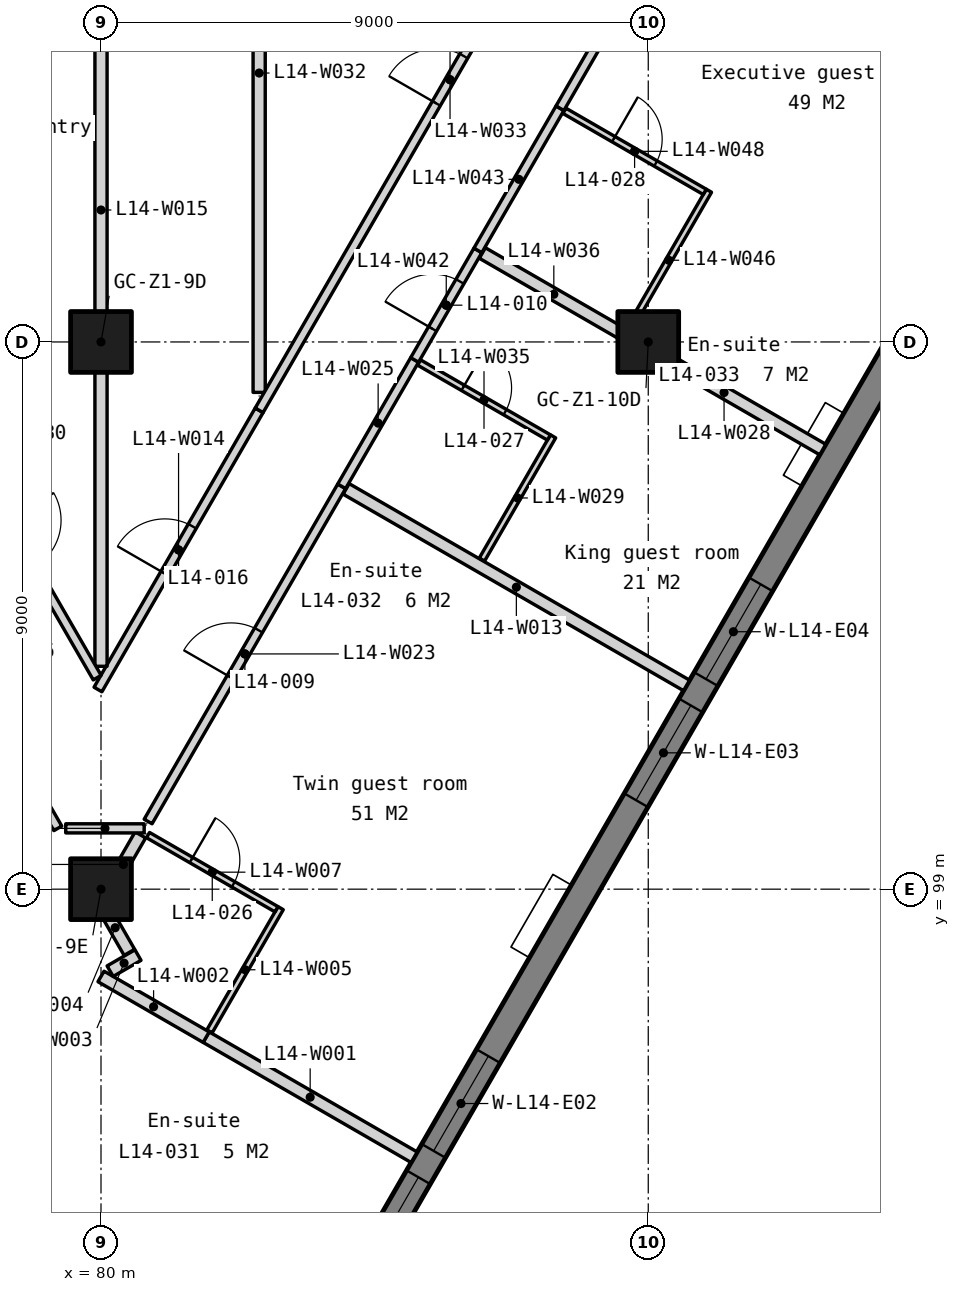
"""IFC4 building model, lengths in metres.
Left out: names, types, materials, properties, quantities, classifications, styles, units other than length and angle.
Written with IfcOpenShell. Run it as: python <this file> out.ifc"""

import sys

from ifc_helpers import new_model, si_unit, direction, frame, frame_2d, origin, origin_2d, place, context, subcontext, project, spatial, polyline, rectangle, outline, extrude, element, fill, save


model = new_model("IFC4")
c1 = context("Model", 3, precision=1e-05, world=origin(), true_north=direction((0.0, 1.0)))
c2 = subcontext(c1, "Body", "Model", "MODEL_VIEW")
j1 = project(units=[si_unit("LENGTHUNIT", "METRE"), si_unit("PLANEANGLEUNIT", "RADIAN")], contexts=[c1])
p1 = place(None, origin())
s1 = spatial("IfcSite", under=j1, at=p1, CompositionType="ELEMENT")
p2 = place(p1, origin())
s2 = spatial("IfcBuilding", under=s1, at=p2, CompositionType="ELEMENT")
p3 = place(p2, frame((0.0, 0.0, 63.0)))
s3 = spatial("IfcBuildingStorey", under=s2, at=p3, CompositionType="ELEMENT", Elevation=63.0)
for number, where, z_axis, x_axis in (
    (1, (80.0, 99.0, 0.0), (0.0, 0.0, 1.0), (1.0, 0.0, 0.0)),
    (2, (80.0, 108.0, 0.0), (0.0, 0.0, 1.0), (1.0, 0.0, 0.0)),
    (3, (89.0, 108.0, 0.0), (0.0, 0.0, 1.0), (1.0, 0.0, 0.0)),
):
    element("IfcColumn", number, at=place(p3, frame(where, z_axis=z_axis, x_axis=x_axis)), inside=s3, PredefinedType="COLUMN", context=c2, shape_type="SweptSolid", body=[
        extrude(rectangle(XDim=1.0, YDim=1.0, at=origin_2d()), origin(), (0.0, 0.0, 1.0), 3.5),
    ])
p4 = place(p3, frame((83.105, 90.599, -0.15), z_axis=(0.0, 0.0, 1.0), x_axis=(0.499999201451, 0.866025864826, 0.0)))
e4 = element("IfcWall", 4, at=p4, inside=s3, PredefinedType="SOLIDWALL", context=c2, shape_type="SweptSolid", body=[
    extrude(outline(polyline([(44.8, 0.0), (44.8, 3.5), (0.0, 3.5), (0.0, 0.0), (44.8, 0.0)])), frame((0.0, 0.225, 0.0), z_axis=(0.0, -1.0, 0.0), x_axis=(1.0, 0.0, 0.0)), (0.0, 0.0, 1.0), 0.45),
])
p5 = place(p4, frame((2.43, 0.0, 1.05)))
e5 = element("IfcOpeningElement", 5, at=p5, cuts=e4, PredefinedType="OPENING", context=c2, shape_type="SweptSolid", body=[
    extrude(rectangle(XDim=1.8, YDim=1.5, at=frame_2d((0.9, 0.75))), frame((0.0, 0.235, 0.0), z_axis=(0.0, -1.0, 0.0), x_axis=(1.0, 0.0, 0.0)), (0.0, 0.0, 1.0), 0.47),
])
p6 = place(p4, frame((4.73, 0.0, 1.05)))
e6 = element("IfcOpeningElement", 6, at=p6, cuts=e4, PredefinedType="OPENING", context=c2, shape_type="SweptSolid", body=[
    extrude(rectangle(XDim=1.8, YDim=1.5, at=frame_2d((0.9, 0.75))), frame((0.0, 0.235, 0.0), z_axis=(0.0, -1.0, 0.0), x_axis=(1.0, 0.0, 0.0)), (0.0, 0.0, 1.0), 0.47),
])
p7 = place(p4, frame((11.39, 0.0, 1.05)))
e7 = element("IfcOpeningElement", 7, at=p7, cuts=e4, PredefinedType="OPENING", context=c2, shape_type="SweptSolid", body=[
    extrude(rectangle(XDim=1.8, YDim=1.5, at=frame_2d((0.9, 0.75))), frame((0.0, 0.235, 0.0), z_axis=(0.0, -1.0, 0.0), x_axis=(1.0, 0.0, 0.0)), (0.0, 0.0, 1.0), 0.47),
])
p8 = place(p4, frame((13.69, 0.0, 1.05)))
e8 = element("IfcOpeningElement", 8, at=p8, cuts=e4, PredefinedType="OPENING", context=c2, shape_type="SweptSolid", body=[
    extrude(rectangle(XDim=1.8, YDim=1.5, at=frame_2d((0.9, 0.75))), frame((0.0, 0.235, 0.0), z_axis=(0.0, -1.0, 0.0), x_axis=(1.0, 0.0, 0.0)), (0.0, 0.0, 1.0), 0.47),
])
p9 = place(p4, frame((20.35, 0.0, 1.05)))
e9 = element("IfcOpeningElement", 9, at=p9, cuts=e4, PredefinedType="OPENING", context=c2, shape_type="SweptSolid", body=[
    extrude(rectangle(XDim=1.8, YDim=1.5, at=frame_2d((0.9, 0.75))), frame((0.0, 0.235, 0.0), z_axis=(0.0, -1.0, 0.0), x_axis=(1.0, 0.0, 0.0)), (0.0, 0.0, 1.0), 0.47),
])
p10 = place(p4, frame((22.65, 0.0, 1.05)))
e10 = element("IfcOpeningElement", 10, at=p10, cuts=e4, PredefinedType="OPENING", context=c2, shape_type="SweptSolid", body=[
    extrude(rectangle(XDim=1.8, YDim=1.5, at=frame_2d((0.9, 0.75))), frame((0.0, 0.235, 0.0), z_axis=(0.0, -1.0, 0.0), x_axis=(1.0, 0.0, 0.0)), (0.0, 0.0, 1.0), 0.47),
])
p11 = place(p4, frame((29.31, 0.0, 1.05)))
e11 = element("IfcOpeningElement", 11, at=p11, cuts=e4, PredefinedType="OPENING", context=c2, shape_type="SweptSolid", body=[
    extrude(rectangle(XDim=1.8, YDim=1.5, at=frame_2d((0.9, 0.75))), frame((0.0, 0.235, 0.0), z_axis=(0.0, -1.0, 0.0), x_axis=(1.0, 0.0, 0.0)), (0.0, 0.0, 1.0), 0.47),
])
p12 = place(p4, frame((31.61, 0.0, 1.05)))
e12 = element("IfcOpeningElement", 12, at=p12, cuts=e4, PredefinedType="OPENING", context=c2, shape_type="SweptSolid", body=[
    extrude(rectangle(XDim=1.8, YDim=1.5, at=frame_2d((0.9, 0.75))), frame((0.0, 0.235, 0.0), z_axis=(0.0, -1.0, 0.0), x_axis=(1.0, 0.0, 0.0)), (0.0, 0.0, 1.0), 0.47),
])
p13 = place(p4, frame((38.27, 0.0, 1.05)))
e13 = element("IfcOpeningElement", 13, at=p13, cuts=e4, PredefinedType="OPENING", context=c2, shape_type="SweptSolid", body=[
    extrude(rectangle(XDim=1.8, YDim=1.5, at=frame_2d((0.9, 0.75))), frame((0.0, 0.235, 0.0), z_axis=(0.0, -1.0, 0.0), x_axis=(1.0, 0.0, 0.0)), (0.0, 0.0, 1.0), 0.47),
])
p14 = place(p4, frame((40.57, 0.0, 1.05)))
e14 = element("IfcOpeningElement", 14, at=p14, cuts=e4, PredefinedType="OPENING", context=c2, shape_type="SweptSolid", body=[
    extrude(rectangle(XDim=1.8, YDim=1.5, at=frame_2d((0.9, 0.75))), frame((0.0, 0.235, 0.0), z_axis=(0.0, -1.0, 0.0), x_axis=(1.0, 0.0, 0.0)), (0.0, 0.0, 1.0), 0.47),
])
p15 = place(p3, frame((81.729, 96.566, 0.0), z_axis=(0.0, 0.0, 1.0), x_axis=(0.866020906874, -0.500007788796, 0.0)))
e15 = element("IfcWall", 15, at=p15, inside=s3, PredefinedType="PARTITIONING", context=c2, shape_type="SweptSolid", body=[
    extrude(rectangle(XDim=3.95, YDim=0.2, at=frame_2d((1.975, 0.0))), origin(), (0.0, 0.0, 1.0), 3.35),
])
p16 = place(p3, frame((80.0, 97.565, 0.0), z_axis=(0.0, 0.0, 1.0), x_axis=(0.866022720283, -0.500004647933, 0.0)))
e16 = element("IfcWall", 16, at=p16, inside=s3, PredefinedType="PARTITIONING", context=c2, shape_type="SweptSolid", body=[
    extrude(rectangle(XDim=1.997, YDim=0.2, at=frame_2d((0.999, 0.0))), origin(), (0.0, 0.0, 1.0), 3.35),
])
p17 = place(p3, frame((80.15, 97.651, 0.0), z_axis=(0.0, 0.0, 1.0), x_axis=(0.866078079006, 0.499908752739, 0.0)))
e17 = element("IfcWall", 17, at=p17, inside=s3, PredefinedType="PARTITIONING", context=c2, shape_type="SweptSolid", body=[
    extrude(rectangle(XDim=0.529, YDim=0.2, at=frame_2d((0.265, 0.0))), origin(), (0.0, 0.0, 1.0), 3.35),
])
p18 = place(p3, frame((80.0, 98.771, 0.0), z_axis=(0.0, 0.0, 1.0), x_axis=(0.499624422845, -0.866242134797, 0.0)))
e18 = element("IfcWall", 18, at=p18, inside=s3, PredefinedType="PARTITIONING", context=c2, shape_type="SweptSolid", body=[
    extrude(rectangle(XDim=0.934, YDim=0.2, at=frame_2d((0.467, 0.0))), origin(), (0.0, 0.0, 1.0), 3.35),
])
p19 = place(p3, frame((81.784, 96.661, 0.0), z_axis=(0.0, 0.0, 1.0), x_axis=(0.500077683152, 0.86598054875, 0.0)))
e19 = element("IfcWall", 19, at=p19, inside=s3, PredefinedType="PARTITIONING", context=c2, shape_type="SweptSolid", body=[
    extrude(rectangle(XDim=2.34, YDim=0.1, at=frame_2d((1.17, 0.0))), origin(), (0.0, 0.0, 1.0), 3.35),
])
p20 = place(p3, frame((80.087, 98.921, 0.0), z_axis=(0.0, 0.0, 1.0), x_axis=(0.499929606556, 0.866066041644, 0.0)))
e20 = element("IfcWall", 20, at=p20, inside=s3, PredefinedType="PARTITIONING", context=c2, shape_type="SweptSolid", body=[
    extrude(rectangle(XDim=1.122, YDim=0.2, at=frame_2d((0.561, 0.0))), origin(), (0.0, 0.0, 1.0), 3.35),
])
p21 = place(p3, frame((80.773, 99.89, 0.0), z_axis=(0.0, 0.0, 1.0), x_axis=(0.865980627057, -0.500077547548, 0.0)))
e21 = element("IfcWall", 21, at=p21, inside=s3, PredefinedType="PARTITIONING", context=c2, shape_type="SweptSolid", body=[
    extrude(rectangle(XDim=2.44, YDim=0.1, at=frame_2d((1.22, 0.0))), origin(), (0.0, 0.0, 1.0), 3.35),
])
p22 = place(p21, frame((0.82, 0.0, 0.0)))
e22 = element("IfcOpeningElement", 22, at=p22, cuts=e21, PredefinedType="OPENING", context=c2, shape_type="SweptSolid", body=[
    extrude(rectangle(XDim=0.8, YDim=2.1, at=frame_2d((0.4, 1.05))), frame((0.0, 0.06, 0.0), z_axis=(0.0, -1.0, 0.0), x_axis=(1.0, 0.0, 0.0)), (0.0, 0.0, 1.0), 0.12),
])
p23 = place(p3, frame((76.042, 105.626, 0.0), z_axis=(0.0, 0.0, 1.0), x_axis=(0.499991405182, -0.866030365948, 0.0)))
e23 = element("IfcWall", 23, at=p23, inside=s3, PredefinedType="PARTITIONING", context=c2, shape_type="SweptSolid", body=[
    extrude(rectangle(XDim=6.496, YDim=0.15, at=frame_2d((3.248, 0.0))), origin(), (0.0, 0.0, 1.0), 3.35),
])
p24 = place(p23, frame((2.798, 0.0, 0.0)))
e24 = element("IfcOpeningElement", 24, at=p24, cuts=e23, PredefinedType="OPENING", context=c2, shape_type="SweptSolid", body=[
    extrude(rectangle(XDim=0.9, YDim=2.1, at=frame_2d((0.45, 1.05))), frame((0.0, 0.085, 0.0), z_axis=(0.0, -1.0, 0.0), x_axis=(1.0, 0.0, 0.0)), (0.0, 0.0, 1.0), 0.17),
])
p25 = place(p3, frame((79.42, 100.0, 0.0), z_axis=(0.0, 0.0, 1.0), x_axis=(0.999999982085, -0.000189286387, 0.0)))
e25 = element("IfcWall", 25, at=p25, inside=s3, PredefinedType="PARTITIONING", context=c2, shape_type="SweptSolid", body=[
    extrude(rectangle(XDim=1.29, YDim=0.15, at=frame_2d((0.645, 0.0))), origin(), (0.0, 0.0, 1.0), 3.35),
])
p26 = place(p3, frame((84.031, 105.583, 0.0), z_axis=(0.0, 0.0, 1.0), x_axis=(0.866015162859, -0.500017737384, 0.0)))
e26 = element("IfcWall", 26, at=p26, inside=s3, PredefinedType="PARTITIONING", context=c2, shape_type="SweptSolid", body=[
    extrude(rectangle(XDim=6.465, YDim=0.2, at=frame_2d((3.232, 0.0))), origin(), (0.0, 0.0, 1.0), 3.35),
])
p27 = place(p3, frame((79.95, 102.284, 0.0), z_axis=(0.0, 0.0, 1.0), x_axis=(0.500026712466, 0.866009980786, 0.0)))
e27 = element("IfcWall", 27, at=p27, inside=s3, PredefinedType="PARTITIONING", context=c2, shape_type="SweptSolid", body=[
    extrude(rectangle(XDim=5.302, YDim=0.15, at=frame_2d((2.651, 0.0))), origin(), (0.0, 0.0, 1.0), 3.35),
])
p28 = place(p27, frame((2.201, 0.0, 0.0)))
e28 = element("IfcOpeningElement", 28, at=p28, cuts=e27, PredefinedType="OPENING", context=c2, shape_type="SweptSolid", body=[
    extrude(rectangle(XDim=0.9, YDim=2.1, at=frame_2d((0.45, 1.05))), frame((0.0, 0.085, 0.0), z_axis=(0.0, -1.0, 0.0), x_axis=(1.0, 0.0, 0.0)), (0.0, 0.0, 1.0), 0.17),
])
p29 = place(p3, frame((80.0, 102.666, 0.0), z_axis=(0.0, 0.0, 1.0), x_axis=(0.0, 1.0, 0.0)))
e29 = element("IfcWall", 29, at=p29, inside=s3, PredefinedType="PARTITIONING", context=c2, shape_type="SweptSolid", body=[
    extrude(rectangle(XDim=15.01, YDim=0.2, at=frame_2d((7.505, 0.0))), origin(), (0.0, 0.0, 1.0), 2.801),
])
p30 = place(p3, frame((80.775, 100.113, 0.0), z_axis=(0.0, 0.0, 1.0), x_axis=(0.5000079448, 0.866020816803, 0.0)))
e30 = element("IfcWall", 30, at=p30, inside=s3, PredefinedType="PARTITIONING", context=c2, shape_type="SweptSolid", body=[
    extrude(rectangle(XDim=6.366, YDim=0.15, at=frame_2d((3.183, 0.0))), origin(), (0.0, 0.0, 1.0), 3.35),
])
p31 = place(p30, frame((2.733, 0.0, 0.0)))
e31 = element("IfcOpeningElement", 31, at=p31, cuts=e30, PredefinedType="OPENING", context=c2, shape_type="SweptSolid", body=[
    extrude(rectangle(XDim=0.9, YDim=2.1, at=frame_2d((0.45, 1.05))), frame((0.0, 0.085, 0.0), z_axis=(0.0, -1.0, 0.0), x_axis=(1.0, 0.0, 0.0)), (0.0, 0.0, 1.0), 0.17),
])
p32 = place(p3, frame((83.958, 105.626, 0.0), z_axis=(0.0, 0.0, 1.0), x_axis=(0.500001309137, 0.866024647952, 0.0)))
e32 = element("IfcWall", 32, at=p32, inside=s3, PredefinedType="PARTITIONING", context=c2, shape_type="SweptSolid", body=[
    extrude(rectangle(XDim=2.4, YDim=0.15, at=frame_2d((1.2, 0.0))), origin(), (0.0, 0.0, 1.0), 3.35),
])
p33 = place(p3, frame((88.623, 108.105, 0.0), z_axis=(0.0, 0.0, 1.0), x_axis=(0.866022959057, -0.500004234368, 0.0)))
e33 = element("IfcWall", 33, at=p33, inside=s3, PredefinedType="PARTITIONING", context=c2, shape_type="SweptSolid", body=[
    extrude(rectangle(XDim=3.75, YDim=0.2, at=frame_2d((1.875, 0.0))), origin(), (0.0, 0.0, 1.0), 3.35),
])
p34 = place(p3, frame((86.264, 104.421, 0.0), z_axis=(0.0, 0.0, 1.0), x_axis=(0.500032503492, 0.866006637072, 0.0)))
e34 = element("IfcWall", 34, at=p34, inside=s3, PredefinedType="PARTITIONING", context=c2, shape_type="SweptSolid", body=[
    extrude(rectangle(XDim=2.34, YDim=0.1, at=frame_2d((1.17, 0.0))), origin(), (0.0, 0.0, 1.0), 3.35),
])
p35 = place(p3, frame((77.399, 106.875, 0.0), z_axis=(0.0, 0.0, 1.0), x_axis=(0.500017996867, -0.866015013039, 0.0)))
e35 = element("IfcWall", 35, at=p35, inside=s3, PredefinedType="PARTITIONING", context=c2, shape_type="SweptSolid", body=[
    extrude(rectangle(XDim=5.077, YDim=0.15, at=frame_2d((2.539, 0.0))), origin(), (0.0, 0.0, 1.0), 3.35),
])
p36 = place(p35, frame((2.088, 0.0, 0.0)))
e36 = element("IfcOpeningElement", 36, at=p36, cuts=e35, PredefinedType="OPENING", context=c2, shape_type="SweptSolid", body=[
    extrude(rectangle(XDim=0.9, YDim=2.1, at=frame_2d((0.45, 1.05))), frame((0.0, 0.085, 0.0), z_axis=(0.0, -1.0, 0.0), x_axis=(1.0, 0.0, 0.0)), (0.0, 0.0, 1.0), 0.17),
])
p37 = place(p3, frame((82.601, 107.171, 0.0), z_axis=(0.0, 0.0, 1.0), x_axis=(0.0, 1.0, 0.0)))
e37 = element("IfcWall", 37, at=p37, inside=s3, PredefinedType="PARTITIONING", context=c2, shape_type="SweptSolid", body=[
    extrude(rectangle(XDim=10.504, YDim=0.2, at=frame_2d((5.252, 0.0))), origin(), (0.0, 0.0, 1.0), 3.35),
])
p38 = place(p3, frame((82.601, 106.875, 0.0), z_axis=(0.0, 0.0, 1.0), x_axis=(0.499995104884, 0.866028229963, 0.0)))
e38 = element("IfcWall", 38, at=p38, inside=s3, PredefinedType="PARTITIONING", context=c2, shape_type="SweptSolid", body=[
    extrude(rectangle(XDim=12.557, YDim=0.15, at=frame_2d((6.278, 0.0))), origin(), (0.0, 0.0, 1.0), 3.35),
])
p39 = place(p38, frame((5.828, 0.0, 0.0)))
e39 = element("IfcOpeningElement", 39, at=p39, cuts=e38, PredefinedType="OPENING", context=c2, shape_type="SweptSolid", body=[
    extrude(rectangle(XDim=0.9, YDim=2.1, at=frame_2d((0.45, 1.05))), frame((0.0, 0.085, 0.0), z_axis=(0.0, -1.0, 0.0), x_axis=(1.0, 0.0, 0.0)), (0.0, 0.0, 1.0), 0.17),
])
p40 = place(p3, frame((85.231, 107.662, 0.0), z_axis=(0.0, 0.0, 1.0), x_axis=(0.866040446274, -0.499973944738, 0.0)))
e40 = element("IfcWall", 40, at=p40, inside=s3, PredefinedType="PARTITIONING", context=c2, shape_type="SweptSolid", body=[
    extrude(rectangle(XDim=2.465, YDim=0.1, at=frame_2d((1.232, 0.0))), origin(), (0.0, 0.0, 1.0), 3.35),
])
p41 = place(p40, frame((0.833, 0.0, 0.0)))
e41 = element("IfcOpeningElement", 41, at=p41, cuts=e40, PredefinedType="OPENING", context=c2, shape_type="SweptSolid", body=[
    extrude(rectangle(XDim=0.8, YDim=2.1, at=frame_2d((0.4, 1.05))), frame((0.0, 0.06, 0.0), z_axis=(0.0, -1.0, 0.0), x_axis=(1.0, 0.0, 0.0)), (0.0, 0.0, 1.0), 0.12),
])
p42 = place(p3, frame((86.271, 109.463, 0.0), z_axis=(0.0, 0.0, 1.0), x_axis=(0.866043331744, -0.499968946578, 0.0)))
e42 = element("IfcWall", 42, at=p42, inside=s3, PredefinedType="PARTITIONING", context=c2, shape_type="SweptSolid", body=[
    extrude(rectangle(XDim=2.715, YDim=0.2, at=frame_2d((1.357, 0.0))), origin(), (0.0, 0.0, 1.0), 3.35),
])
p43 = place(p3, frame((85.158, 107.704, 0.0), z_axis=(0.0, 0.0, 1.0), x_axis=(0.500027264788, 0.866009661879, 0.0)))
e43 = element("IfcWall", 43, at=p43, inside=s3, PredefinedType="PARTITIONING", context=c2, shape_type="SweptSolid", body=[
    extrude(rectangle(XDim=2.08, YDim=0.15, at=frame_2d((1.04, 0.0))), origin(), (0.0, 0.0, 1.0), 3.35),
])
p44 = place(p43, frame((0.59, 0.0, 0.0)))
e44 = element("IfcOpeningElement", 44, at=p44, cuts=e43, PredefinedType="OPENING", context=c2, shape_type="SweptSolid", body=[
    extrude(rectangle(XDim=0.9, YDim=2.1, at=frame_2d((0.45, 1.05))), frame((0.0, 0.085, 0.0), z_axis=(0.0, -1.0, 0.0), x_axis=(1.0, 0.0, 0.0)), (0.0, 0.0, 1.0), 0.17),
])
p45 = place(p3, frame((86.198, 109.505, 0.0), z_axis=(0.0, 0.0, 1.0), x_axis=(0.50000943426, 0.866019956843, 0.0)))
e45 = element("IfcWall", 45, at=p45, inside=s3, PredefinedType="PARTITIONING", context=c2, shape_type="SweptSolid", body=[
    extrude(rectangle(XDim=2.7, YDim=0.15, at=frame_2d((1.35, 0.0))), origin(), (0.0, 0.0, 1.0), 3.35),
])
p46 = place(p3, frame((88.678, 108.201, 0.0), z_axis=(0.0, 0.0, 1.0), x_axis=(0.500007957085, 0.86602080971, 0.0)))
e46 = element("IfcWall", 46, at=p46, inside=s3, PredefinedType="PARTITIONING", context=c2, shape_type="SweptSolid", body=[
    extrude(rectangle(XDim=2.64, YDim=0.1, at=frame_2d((1.32, 0.0))), origin(), (0.0, 0.0, 1.0), 3.35),
])
p47 = place(p3, frame((87.621, 111.801, 0.0), z_axis=(0.0, 0.0, 1.0), x_axis=(0.866036091453, -0.499981487958, 0.0)))
e47 = element("IfcWall", 47, at=p47, inside=s3, PredefinedType="PARTITIONING", context=c2, shape_type="SweptSolid", body=[
    extrude(rectangle(XDim=2.665, YDim=0.1, at=frame_2d((1.333, 0.0))), origin(), (0.0, 0.0, 1.0), 3.35),
])
p48 = place(p47, frame((0.933, 0.0, 0.0)))
e48 = element("IfcOpeningElement", 48, at=p48, cuts=e47, PredefinedType="OPENING", context=c2, shape_type="SweptSolid", body=[
    extrude(rectangle(XDim=0.8, YDim=2.1, at=frame_2d((0.4, 1.05))), frame((0.0, 0.06, 0.0), z_axis=(0.0, -1.0, 0.0), x_axis=(1.0, 0.0, 0.0)), (0.0, 0.0, 1.0), 0.12),
])
p49 = place(p3, frame((87.548, 111.844, 0.0), z_axis=(0.0, 0.0, 1.0), x_axis=(0.499981277565, 0.866036212918, 0.0)))
e49 = element("IfcWall", 49, at=p49, inside=s3, PredefinedType="PARTITIONING", context=c2, shape_type="SweptSolid", body=[
    extrude(rectangle(XDim=6.26, YDim=0.15, at=frame_2d((3.13, 0.0))), origin(), (0.0, 0.0, 1.0), 3.35),
])
p50 = place(p49, frame((2.63, 0.0, 0.0)))
e50 = element("IfcOpeningElement", 50, at=p50, cuts=e49, PredefinedType="OPENING", context=c2, shape_type="SweptSolid", body=[
    extrude(rectangle(XDim=1.0, YDim=2.1, at=frame_2d((0.5, 1.05))), frame((0.0, 0.085, 0.0), z_axis=(0.0, -1.0, 0.0), x_axis=(1.0, 0.0, 0.0)), (0.0, 0.0, 1.0), 0.17),
])
p51 = place(p5, origin())
e51 = element("IfcWindow", 51, at=p51, inside=s3, PartitioningType="SINGLE_PANEL", PredefinedType="WINDOW", context=c2, shape_type="SweptSolid", body=[
    extrude(rectangle(XDim=1.8, YDim=1.5, at=frame_2d((0.9, 0.75))), frame((0.0, 0.03, 0.0), z_axis=(0.0, -1.0, 0.0), x_axis=(1.0, 0.0, 0.0)), (0.0, 0.0, 1.0), 0.06),
])
fill(e5, e51)
p52 = place(p6, origin())
e52 = element("IfcWindow", 52, at=p52, inside=s3, PartitioningType="SINGLE_PANEL", PredefinedType="WINDOW", context=c2, shape_type="SweptSolid", body=[
    extrude(rectangle(XDim=1.8, YDim=1.5, at=frame_2d((0.9, 0.75))), frame((0.0, 0.03, 0.0), z_axis=(0.0, -1.0, 0.0), x_axis=(1.0, 0.0, 0.0)), (0.0, 0.0, 1.0), 0.06),
])
fill(e6, e52)
p53 = place(p7, origin())
e53 = element("IfcWindow", 53, at=p53, inside=s3, PartitioningType="SINGLE_PANEL", PredefinedType="WINDOW", context=c2, shape_type="SweptSolid", body=[
    extrude(rectangle(XDim=1.8, YDim=1.5, at=frame_2d((0.9, 0.75))), frame((0.0, 0.03, 0.0), z_axis=(0.0, -1.0, 0.0), x_axis=(1.0, 0.0, 0.0)), (0.0, 0.0, 1.0), 0.06),
])
fill(e7, e53)
p54 = place(p8, origin())
e54 = element("IfcWindow", 54, at=p54, inside=s3, PartitioningType="SINGLE_PANEL", PredefinedType="WINDOW", context=c2, shape_type="SweptSolid", body=[
    extrude(rectangle(XDim=1.8, YDim=1.5, at=frame_2d((0.9, 0.75))), frame((0.0, 0.03, 0.0), z_axis=(0.0, -1.0, 0.0), x_axis=(1.0, 0.0, 0.0)), (0.0, 0.0, 1.0), 0.06),
])
fill(e8, e54)
p55 = place(p31, origin())
e55 = element("IfcDoor", 55, at=p55, inside=s3, OperationType="SINGLE_SWING_LEFT", PredefinedType="DOOR", context=c2, shape_type="SweptSolid", body=[
    extrude(rectangle(XDim=0.9, YDim=2.1, at=frame_2d((0.45, 1.05))), frame((0.0, 0.025, 0.0), z_axis=(0.0, -1.0, 0.0), x_axis=(1.0, 0.0, 0.0)), (0.0, 0.0, 1.0), 0.05),
])
fill(e31, e55)
p56 = place(p44, origin())
e56 = element("IfcDoor", 56, at=p56, inside=s3, OperationType="SINGLE_SWING_LEFT", PredefinedType="DOOR", context=c2, shape_type="SweptSolid", body=[
    extrude(rectangle(XDim=0.9, YDim=2.1, at=frame_2d((0.45, 1.05))), frame((0.0, 0.025, 0.0), z_axis=(0.0, -1.0, 0.0), x_axis=(1.0, 0.0, 0.0)), (0.0, 0.0, 1.0), 0.05),
])
fill(e44, e56)
p57 = place(p28, origin())
e57 = element("IfcDoor", 57, at=p57, inside=s3, OperationType="SINGLE_SWING_LEFT", PredefinedType="DOOR", context=c2, shape_type="SweptSolid", body=[
    extrude(rectangle(XDim=0.9, YDim=2.1, at=frame_2d((0.45, 1.05))), frame((0.0, 0.025, 0.0), z_axis=(0.0, -1.0, 0.0), x_axis=(1.0, 0.0, 0.0)), (0.0, 0.0, 1.0), 0.05),
])
fill(e28, e57)
p58 = place(p39, origin())
e58 = element("IfcDoor", 58, at=p58, inside=s3, OperationType="SINGLE_SWING_LEFT", PredefinedType="DOOR", context=c2, shape_type="SweptSolid", body=[
    extrude(rectangle(XDim=0.9, YDim=2.1, at=frame_2d((0.45, 1.05))), frame((0.0, 0.025, 0.0), z_axis=(0.0, -1.0, 0.0), x_axis=(1.0, 0.0, 0.0)), (0.0, 0.0, 1.0), 0.05),
])
fill(e39, e58)
p59 = place(p22, origin())
e59 = element("IfcDoor", 59, at=p59, inside=s3, OperationType="SINGLE_SWING_LEFT", PredefinedType="DOOR", context=c2, shape_type="SweptSolid", body=[
    extrude(rectangle(XDim=0.8, YDim=2.1, at=frame_2d((0.4, 1.05))), frame((0.0, 0.025, 0.0), z_axis=(0.0, -1.0, 0.0), x_axis=(1.0, 0.0, 0.0)), (0.0, 0.0, 1.0), 0.05),
])
fill(e22, e59)
p60 = place(p41, origin())
e60 = element("IfcDoor", 60, at=p60, inside=s3, OperationType="SINGLE_SWING_LEFT", PredefinedType="DOOR", context=c2, shape_type="SweptSolid", body=[
    extrude(rectangle(XDim=0.8, YDim=2.1, at=frame_2d((0.4, 1.05))), frame((0.0, 0.025, 0.0), z_axis=(0.0, -1.0, 0.0), x_axis=(1.0, 0.0, 0.0)), (0.0, 0.0, 1.0), 0.05),
])
fill(e41, e60)
p61 = place(p48, origin())
e61 = element("IfcDoor", 61, at=p61, inside=s3, OperationType="SINGLE_SWING_LEFT", PredefinedType="DOOR", context=c2, shape_type="SweptSolid", body=[
    extrude(rectangle(XDim=0.8, YDim=2.1, at=frame_2d((0.4, 1.05))), frame((0.0, 0.025, 0.0), z_axis=(0.0, -1.0, 0.0), x_axis=(1.0, 0.0, 0.0)), (0.0, 0.0, 1.0), 0.05),
])
fill(e48, e61)
save(model, sys.argv[1])
